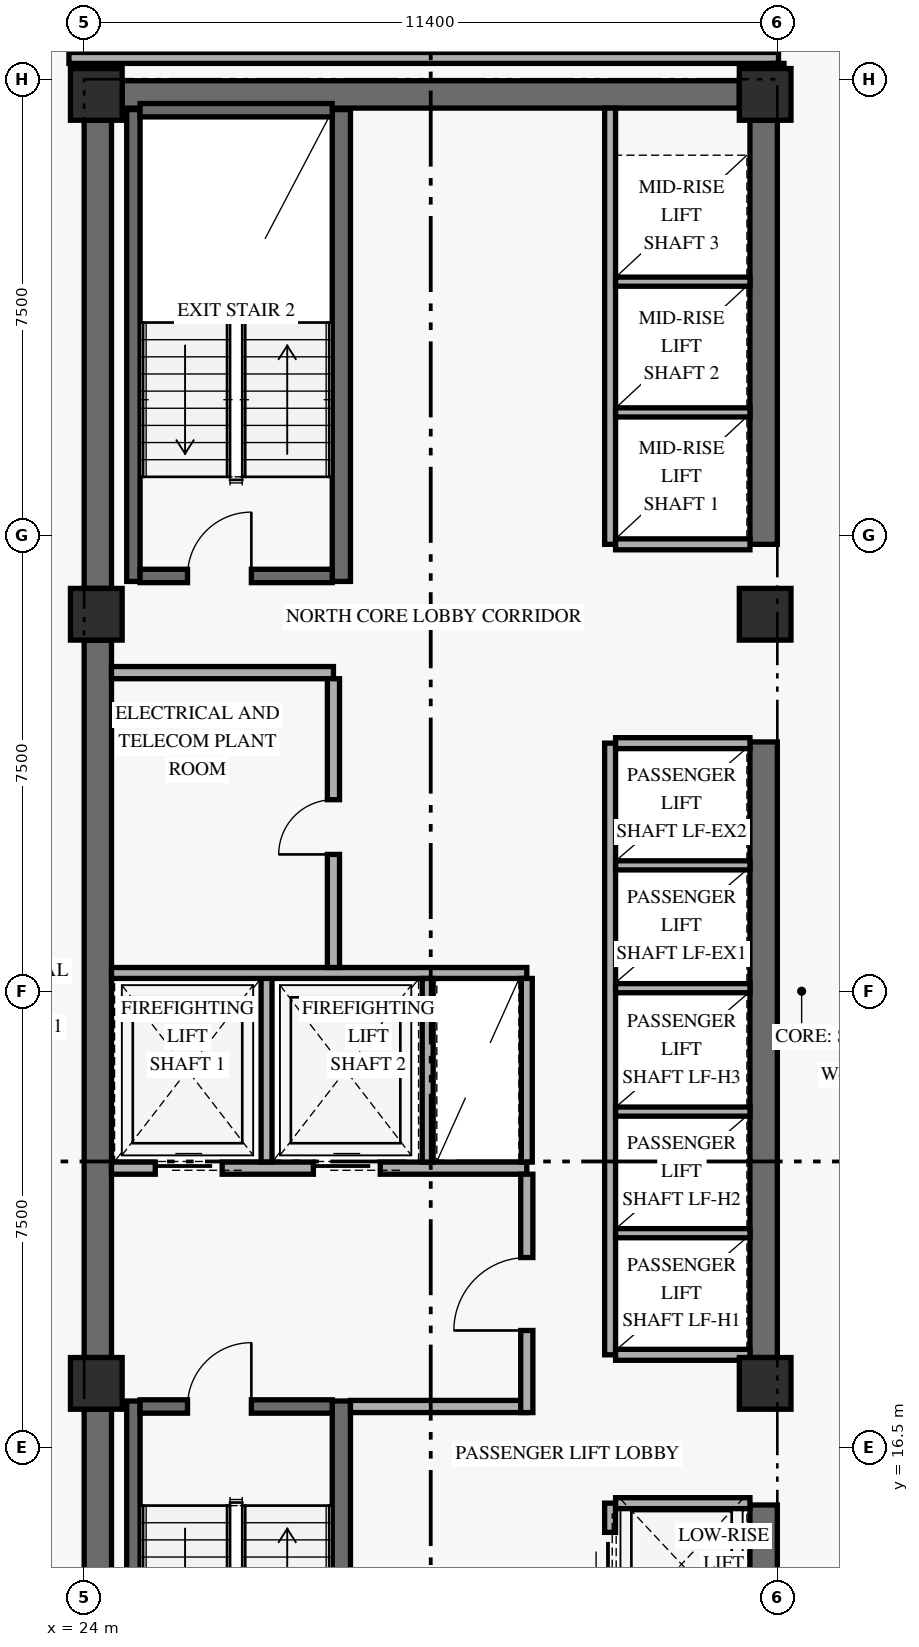
"""IFC4 building model, lengths in metres.
Left out: names, types, materials, properties, quantities, classifications, styles, units other than length and angle.
Written with IfcOpenShell. Run it as: python <this file> out.ifc"""

import sys

from ifc_helpers import new_model, si_unit, direction, frame, frame_2d, origin, origin_2d, place, context, subcontext, project, spatial, rectangle, extrude, element, fill, save


model = new_model("IFC4")
c1 = context("Model", 3, precision=1e-05, world=origin(), true_north=direction((0.0, 1.0)))
c2 = subcontext(c1, "Body", "Model", "MODEL_VIEW")
j1 = project(units=[si_unit("LENGTHUNIT", "METRE"), si_unit("PLANEANGLEUNIT", "RADIAN")], contexts=[c1])
p1 = place(None, origin())
s1 = spatial("IfcSite", under=j1, at=p1, CompositionType="ELEMENT")
p2 = place(p1, origin())
s2 = spatial("IfcBuilding", under=s1, at=p2, CompositionType="ELEMENT")
p3 = place(p2, frame((0.0, 0.0, 67.8)))
s3 = spatial("IfcBuildingStorey", under=s2, at=p3, CompositionType="ELEMENT", Elevation=67.8)
p4 = place(p3, frame((24.225, 9.675, 0.0), z_axis=(0.0, 0.0, 1.0), x_axis=(0.0, 1.0, 0.0)))
e1 = element("IfcWall", 1, at=p4, inside=s3, PredefinedType="SHEAR", context=c2, shape_type="SweptSolid", body=[
    extrude(rectangle(XDim=7.45, YDim=0.45, at=frame_2d((3.725, 0.0))), origin(), (0.0, 0.0, 1.0), 2.607),
])
p5 = place(p3, frame((24.225, 17.975, 0.0), z_axis=(0.0, 0.0, 1.0), x_axis=(0.0, 1.0, 0.0)))
e2 = element("IfcWall", 2, at=p5, inside=s3, PredefinedType="SHEAR", context=c2, shape_type="SweptSolid", body=[
    extrude(rectangle(XDim=11.8, YDim=0.45, at=frame_2d((5.9, 0.0))), origin(), (0.0, 0.0, 1.0), 2.607),
])
p6 = place(p3, frame((24.225, 30.625, 0.0), z_axis=(0.0, 0.0, 1.0), x_axis=(0.0, 1.0, 0.0)))
e3 = element("IfcWall", 3, at=p6, inside=s3, PredefinedType="SHEAR", context=c2, shape_type="SweptSolid", body=[
    extrude(rectangle(XDim=7.7, YDim=0.45, at=frame_2d((3.85, 0.0))), origin(), (0.0, 0.0, 1.0), 2.607),
])
p7 = place(p3, frame((35.175, 9.675, 0.0), z_axis=(0.0, 0.0, 1.0), x_axis=(0.0, 1.0, 0.0)))
e4 = element("IfcWall", 4, at=p7, inside=s3, PredefinedType="SHEAR", context=c2, shape_type="SweptSolid", body=[
    extrude(rectangle(XDim=5.875, YDim=0.45, at=frame_2d((2.938, 0.0))), origin(), (0.0, 0.0, 1.0), 2.607),
])
p8 = place(p3, frame((35.175, 17.975, 0.0), z_axis=(0.0, 0.0, 1.0), x_axis=(0.0, 1.0, 0.0)))
e5 = element("IfcWall", 5, at=p8, inside=s3, PredefinedType="SHEAR", context=c2, shape_type="SweptSolid", body=[
    extrude(rectangle(XDim=10.125, YDim=0.45, at=frame_2d((5.062, 0.0))), origin(), (0.0, 0.0, 1.0), 2.607),
])
p9 = place(p3, frame((35.175, 31.35, 0.0), z_axis=(0.0, 0.0, 1.0), x_axis=(0.0, 1.0, 0.0)))
e6 = element("IfcWall", 6, at=p9, inside=s3, PredefinedType="SHEAR", context=c2, shape_type="SweptSolid", body=[
    extrude(rectangle(XDim=6.975, YDim=0.45, at=frame_2d((3.487, 0.0))), origin(), (0.0, 0.0, 1.0), 2.607),
])
p10 = place(p3, frame((24.625, 38.75, 0.0), z_axis=(0.0, 0.0, 1.0), x_axis=(1.0, 0.0, 0.0)))
e7 = element("IfcWall", 7, at=p10, inside=s3, PredefinedType="SHEAR", context=c2, shape_type="SweptSolid", body=[
    extrude(rectangle(XDim=10.15, YDim=0.45, at=frame_2d((5.075, 0.0))), origin(), (0.0, 0.0, 1.0), 3.3),
])
p11 = place(p3, frame((24.81, 9.5, 0.0), z_axis=(0.0, 0.0, 1.0), x_axis=(0.0, 1.0, 0.0)))
e8 = element("IfcWall", 8, at=p11, inside=s3, PredefinedType="SHEAR", context=c2, shape_type="SweptSolid", body=[
    extrude(rectangle(XDim=7.76, YDim=0.22, at=frame_2d((3.88, 0.0))), origin(), (0.0, 0.0, 1.0), 3.3),
])
p12 = place(p3, frame((28.23, 9.5, 0.0), z_axis=(0.0, 0.0, 1.0), x_axis=(0.0, 1.0, 0.0)))
e9 = element("IfcWall", 9, at=p12, inside=s3, PredefinedType="SHEAR", context=c2, shape_type="SweptSolid", body=[
    extrude(rectangle(XDim=7.76, YDim=0.3, at=frame_2d((3.88, 0.0))), origin(), (0.0, 0.0, 1.0), 3.3),
])
p13 = place(p3, frame((24.92, 17.17, 0.0), z_axis=(0.0, 0.0, 1.0), x_axis=(1.0, 0.0, 0.0)))
e10 = element("IfcWall", 10, at=p13, inside=s3, PredefinedType="SHEAR", context=c2, shape_type="SweptSolid", body=[
    extrude(rectangle(XDim=3.16, YDim=0.22, at=frame_2d((1.58, 0.0))), origin(), (0.0, 0.0, 1.0), 3.3),
])
p14 = place(p13, frame((0.78, 0.0, 0.0)))
e11 = element("IfcOpeningElement", 11, at=p14, cuts=e10, PredefinedType="OPENING", context=c2, shape_type="SweptSolid", body=[
    extrude(rectangle(XDim=1.05, YDim=2.15, at=frame_2d((0.525, 1.075))), frame((0.0, 0.12, 0.0), z_axis=(0.0, -1.0, 0.0), x_axis=(1.0, 0.0, 0.0)), (0.0, 0.0, 1.0), 0.24),
])
p15 = place(p3, frame((24.81, 30.74, 0.0), z_axis=(0.0, 0.0, 1.0), x_axis=(0.0, 1.0, 0.0)))
e12 = element("IfcWall", 12, at=p15, inside=s3, PredefinedType="SHEAR", context=c2, shape_type="SweptSolid", body=[
    extrude(rectangle(XDim=7.76, YDim=0.22, at=frame_2d((3.88, 0.0))), origin(), (0.0, 0.0, 1.0), 3.3),
])
p16 = place(p3, frame((28.23, 30.74, 0.0), z_axis=(0.0, 0.0, 1.0), x_axis=(0.0, 1.0, 0.0)))
e13 = element("IfcWall", 13, at=p16, inside=s3, PredefinedType="SHEAR", context=c2, shape_type="SweptSolid", body=[
    extrude(rectangle(XDim=7.76, YDim=0.3, at=frame_2d((3.88, 0.0))), origin(), (0.0, 0.0, 1.0), 3.3),
])
p17 = place(p3, frame((24.92, 30.83, 0.0), z_axis=(0.0, 0.0, 1.0), x_axis=(1.0, 0.0, 0.0)))
e14 = element("IfcWall", 14, at=p17, inside=s3, PredefinedType="SHEAR", context=c2, shape_type="SweptSolid", body=[
    extrude(rectangle(XDim=3.16, YDim=0.22, at=frame_2d((1.58, 0.0))), origin(), (0.0, 0.0, 1.0), 3.3),
])
p18 = place(p17, frame((0.78, 0.0, 0.0)))
e15 = element("IfcOpeningElement", 15, at=p18, cuts=e14, PredefinedType="OPENING", context=c2, shape_type="SweptSolid", body=[
    extrude(rectangle(XDim=1.05, YDim=2.15, at=frame_2d((0.525, 1.075))), frame((0.0, 0.12, 0.0), z_axis=(0.0, -1.0, 0.0), x_axis=(1.0, 0.0, 0.0)), (0.0, 0.0, 1.0), 0.24),
])
p19 = place(p3, frame((24.92, 38.49, 0.0), z_axis=(0.0, 0.0, 1.0), x_axis=(1.0, 0.0, 0.0)))
e16 = element("IfcWall", 16, at=p19, inside=s3, PredefinedType="SHEAR", context=c2, shape_type="SweptSolid", body=[
    extrude(rectangle(XDim=3.16, YDim=0.22, at=frame_2d((1.58, 0.0))), origin(), (0.0, 0.0, 1.0), 3.3),
])
for number, where, z_axis, x_axis in (
    (17, (24.2, 17.55, 0.0), (0.0, 0.0, 1.0), (1.0, 0.0, 0.0)),
    (18, (24.2, 30.2, 0.0), (0.0, 0.0, 1.0), (1.0, 0.0, 0.0)),
    (19, (24.2, 38.75, 0.0), (0.0, 0.0, 1.0), (1.0, 0.0, 0.0)),
    (20, (35.2, 17.55, 0.0), (0.0, 0.0, 1.0), (1.0, 0.0, 0.0)),
    (21, (35.2, 30.2, 0.0), (0.0, 0.0, 1.0), (1.0, 0.0, 0.0)),
    (22, (35.2, 38.75, 0.0), (0.0, 0.0, 1.0), (1.0, 0.0, 0.0)),
):
    element("IfcColumn", number, at=place(p3, frame(where, z_axis=z_axis, x_axis=x_axis)), inside=s3, PredefinedType="COLUMN", context=c2, shape_type="SweptSolid", body=[
        extrude(rectangle(XDim=0.85, YDim=0.85, at=origin_2d()), origin(), (0.0, 0.0, 1.0), 3.6),
    ])
p20 = place(p3, frame((24.45, 21.09, 0.0), z_axis=(0.0, 0.0, 1.0), x_axis=(1.0, 0.0, 0.0)))
e23 = element("IfcWall", 23, at=p20, inside=s3, PredefinedType="STANDARD", context=c2, shape_type="SweptSolid", body=[
    extrude(rectangle(XDim=6.83, YDim=0.2, at=frame_2d((3.415, 0.0))), origin(), (0.0, 0.0, 1.0), 3.3),
])
p21 = place(p20, frame((0.72, 0.0, 0.0)))
e24 = element("IfcOpeningElement", 24, at=p21, cuts=e23, PredefinedType="OPENING", context=c2, shape_type="SweptSolid", body=[
    extrude(rectangle(XDim=1.1, YDim=2.2, at=frame_2d((0.55, 1.1))), frame((0.0, 0.11, 0.0), z_axis=(0.0, -1.0, 0.0), x_axis=(1.0, 0.0, 0.0)), (0.0, 0.0, 1.0), 0.22),
])
p22 = place(p20, frame((3.32, 0.0, 0.0)))
e25 = element("IfcOpeningElement", 25, at=p22, cuts=e23, PredefinedType="OPENING", context=c2, shape_type="SweptSolid", body=[
    extrude(rectangle(XDim=1.1, YDim=2.2, at=frame_2d((0.55, 1.1))), frame((0.0, 0.11, 0.0), z_axis=(0.0, -1.0, 0.0), x_axis=(1.0, 0.0, 0.0)), (0.0, 0.0, 1.0), 0.22),
])
p23 = place(p3, frame((28.38, 17.17, 0.0), z_axis=(0.0, 0.0, 1.0), x_axis=(1.0, 0.0, 0.0)))
e26 = element("IfcWall", 26, at=p23, inside=s3, PredefinedType="STANDARD", context=c2, shape_type="SweptSolid", body=[
    extrude(rectangle(XDim=2.9, YDim=0.2, at=frame_2d((1.45, 0.0))), origin(), (0.0, 0.0, 1.0), 3.3),
])
p24 = place(p3, frame((31.28, 17.07, 0.0), z_axis=(0.0, 0.0, 1.0), x_axis=(0.0, 1.0, 0.0)))
e27 = element("IfcWall", 27, at=p24, inside=s3, PredefinedType="STANDARD", context=c2, shape_type="SweptSolid", body=[
    extrude(rectangle(XDim=3.92, YDim=0.2, at=frame_2d((1.96, 0.0))), origin(), (0.0, 0.0, 1.0), 2.589),
])
p25 = place(p24, frame((1.35, 0.0, 0.0)))
e28 = element("IfcOpeningElement", 28, at=p25, cuts=e27, PredefinedType="OPENING", context=c2, shape_type="SweptSolid", body=[
    extrude(rectangle(XDim=1.2, YDim=2.15, at=frame_2d((0.6, 1.075))), frame((0.0, 0.11, 0.0), z_axis=(0.0, -1.0, 0.0), x_axis=(1.0, 0.0, 0.0)), (0.0, 0.0, 1.0), 0.22),
])
p26 = place(p3, frame((27.0, 21.19, 0.0), z_axis=(0.0, 0.0, 1.0), x_axis=(0.0, 1.0, 0.0)))
e29 = element("IfcWall", 29, at=p26, inside=s3, PredefinedType="STANDARD", context=c2, shape_type="SweptSolid", body=[
    extrude(rectangle(XDim=3.11, YDim=0.18, at=frame_2d((1.555, 0.0))), origin(), (0.0, 0.0, 1.0), 3.3),
])
p27 = place(p3, frame((24.45, 24.3, 0.0), z_axis=(0.0, 0.0, 1.0), x_axis=(1.0, 0.0, 0.0)))
e30 = element("IfcWall", 30, at=p27, inside=s3, PredefinedType="STANDARD", context=c2, shape_type="SweptSolid", body=[
    extrude(rectangle(XDim=6.83, YDim=0.18, at=frame_2d((3.415, 0.0))), origin(), (0.0, 0.0, 1.0), 3.3),
])
for number, where, z_axis, x_axis in (
    (31, (29.65, 21.19, 0.0), (0.0, 0.0, 1.0), (0.0, 1.0, 0.0)),
    (32, (31.28, 21.19, 0.0), (0.0, 0.0, 1.0), (0.0, 1.0, 0.0)),
):
    element("IfcWall", number, at=place(p3, frame(where, z_axis=z_axis, x_axis=x_axis)), inside=s3, PredefinedType="STANDARD", context=c2, shape_type="SweptSolid", body=[
        extrude(rectangle(XDim=3.02, YDim=0.18, at=frame_2d((1.51, 0.0))), origin(), (0.0, 0.0, 1.0), 3.3),
    ])
p28 = place(p3, frame((24.45, 29.24, 0.0), z_axis=(0.0, 0.0, 1.0), x_axis=(1.0, 0.0, 0.0)))
e33 = element("IfcWall", 33, at=p28, inside=s3, PredefinedType="STANDARD", context=c2, shape_type="SweptSolid", body=[
    extrude(rectangle(XDim=3.65, YDim=0.2, at=frame_2d((1.825, 0.0))), origin(), (0.0, 0.0, 1.0), 3.3),
])
p29 = place(p3, frame((28.1, 24.39, 0.0), z_axis=(0.0, 0.0, 1.0), x_axis=(0.0, 1.0, 0.0)))
e34 = element("IfcWall", 34, at=p29, inside=s3, PredefinedType="STANDARD", context=c2, shape_type="SweptSolid", body=[
    extrude(rectangle(XDim=4.75, YDim=0.2, at=frame_2d((2.375, 0.0))), origin(), (0.0, 0.0, 1.0), 3.3),
])
p30 = place(p29, frame((1.86, 0.0, 0.0)))
e35 = element("IfcOpeningElement", 35, at=p30, cuts=e34, PredefinedType="OPENING", context=c2, shape_type="SweptSolid", body=[
    extrude(rectangle(XDim=0.9, YDim=2.1, at=frame_2d((0.45, 1.05))), frame((0.0, 0.11, 0.0), z_axis=(0.0, -1.0, 0.0), x_axis=(1.0, 0.0, 0.0)), (0.0, 0.0, 1.0), 0.22),
])
p31 = place(p3, frame((32.65, 9.5, 0.0), z_axis=(0.0, 0.0, 1.0), x_axis=(0.0, 1.0, 0.0)))
e36 = element("IfcWall", 36, at=p31, inside=s3, PredefinedType="STANDARD", context=c2, shape_type="SweptSolid", body=[
    extrude(rectangle(XDim=6.08, YDim=0.18, at=frame_2d((3.04, 0.0))), origin(), (0.0, 0.0, 1.0), 3.3),
])
p32 = place(p31, frame((0.55, 0.0, 0.0)))
e37 = element("IfcOpeningElement", 37, at=p32, cuts=e36, PredefinedType="OPENING", context=c2, shape_type="SweptSolid", body=[
    extrude(rectangle(XDim=1.05, YDim=2.2, at=frame_2d((0.525, 1.1))), frame((0.0, 0.1, 0.0), z_axis=(0.0, -1.0, 0.0), x_axis=(1.0, 0.0, 0.0)), (0.0, 0.0, 1.0), 0.2),
])
p33 = place(p31, frame((2.55, 0.0, 0.0)))
e38 = element("IfcOpeningElement", 38, at=p33, cuts=e36, PredefinedType="OPENING", context=c2, shape_type="SweptSolid", body=[
    extrude(rectangle(XDim=1.05, YDim=2.2, at=frame_2d((0.525, 1.1))), frame((0.0, 0.1, 0.0), z_axis=(0.0, -1.0, 0.0), x_axis=(1.0, 0.0, 0.0)), (0.0, 0.0, 1.0), 0.2),
])
p34 = place(p31, frame((4.55, 0.0, 0.0)))
e39 = element("IfcOpeningElement", 39, at=p34, cuts=e36, PredefinedType="OPENING", context=c2, shape_type="SweptSolid", body=[
    extrude(rectangle(XDim=1.05, YDim=2.2, at=frame_2d((0.525, 1.1))), frame((0.0, 0.1, 0.0), z_axis=(0.0, -1.0, 0.0), x_axis=(1.0, 0.0, 0.0)), (0.0, 0.0, 1.0), 0.2),
])
p35 = place(p3, frame((32.74, 15.58, 0.0), z_axis=(0.0, 0.0, 1.0), x_axis=(1.0, 0.0, 0.0)))
e40 = element("IfcWall", 40, at=p35, inside=s3, PredefinedType="STANDARD", context=c2, shape_type="SweptSolid", body=[
    extrude(rectangle(XDim=2.21, YDim=0.18, at=frame_2d((1.105, 0.0))), origin(), (0.0, 0.0, 1.0), 3.3),
])
p36 = place(p3, frame((32.65, 18.02, 0.0), z_axis=(0.0, 0.0, 1.0), x_axis=(0.0, 1.0, 0.0)))
e41 = element("IfcWall", 41, at=p36, inside=s3, PredefinedType="STANDARD", context=c2, shape_type="SweptSolid", body=[
    extrude(rectangle(XDim=10.06, YDim=0.18, at=frame_2d((5.03, 0.0))), origin(), (0.0, 0.0, 1.0), 3.3),
])
for number, where, z_axis, x_axis in (
    (42, (32.74, 18.02, 0.0), (0.0, 0.0, 1.0), (1.0, 0.0, 0.0)),
    (43, (32.74, 28.08, 0.0), (0.0, 0.0, 1.0), (1.0, 0.0, 0.0)),
):
    element("IfcWall", number, at=place(p3, frame(where, z_axis=z_axis, x_axis=x_axis)), inside=s3, PredefinedType="STANDARD", context=c2, shape_type="SweptSolid", body=[
        extrude(rectangle(XDim=2.21, YDim=0.18, at=frame_2d((1.105, 0.0))), origin(), (0.0, 0.0, 1.0), 3.3),
    ])
for number, where, z_axis, x_axis in (
    (44, (32.74, 20.02, 0.0), (0.0, 0.0, 1.0), (1.0, 0.0, 0.0)),
    (45, (32.74, 22.02, 0.0), (0.0, 0.0, 1.0), (1.0, 0.0, 0.0)),
    (46, (32.74, 24.05, 0.0), (0.0, 0.0, 1.0), (1.0, 0.0, 0.0)),
    (47, (32.74, 26.07, 0.0), (0.0, 0.0, 1.0), (1.0, 0.0, 0.0)),
):
    element("IfcWall", number, at=place(p3, frame(where, z_axis=z_axis, x_axis=x_axis)), inside=s3, PredefinedType="STANDARD", context=c2, shape_type="SweptSolid", body=[
        extrude(rectangle(XDim=2.21, YDim=0.15, at=frame_2d((1.105, 0.0))), origin(), (0.0, 0.0, 1.0), 3.3),
    ])
p37 = place(p3, frame((32.65, 31.35, 0.0), z_axis=(0.0, 0.0, 1.0), x_axis=(0.0, 1.0, 0.0)))
e48 = element("IfcWall", 48, at=p37, inside=s3, PredefinedType="STANDARD", context=c2, shape_type="SweptSolid", body=[
    extrude(rectangle(XDim=7.175, YDim=0.18, at=frame_2d((3.587, 0.0))), origin(), (0.0, 0.0, 1.0), 3.3),
])
p38 = place(p3, frame((32.74, 31.35, 0.0), z_axis=(0.0, 0.0, 1.0), x_axis=(1.0, 0.0, 0.0)))
e49 = element("IfcWall", 49, at=p38, inside=s3, PredefinedType="STANDARD", context=c2, shape_type="SweptSolid", body=[
    extrude(rectangle(XDim=2.21, YDim=0.18, at=frame_2d((1.105, 0.0))), origin(), (0.0, 0.0, 1.0), 3.3),
])
for number, where, z_axis, x_axis in (
    (50, (32.74, 33.52, 0.0), (0.0, 0.0, 1.0), (1.0, 0.0, 0.0)),
    (51, (32.74, 35.67, 0.0), (0.0, 0.0, 1.0), (1.0, 0.0, 0.0)),
):
    element("IfcWall", number, at=place(p3, frame(where, z_axis=z_axis, x_axis=x_axis)), inside=s3, PredefinedType="STANDARD", context=c2, shape_type="SweptSolid", body=[
        extrude(rectangle(XDim=2.21, YDim=0.15, at=frame_2d((1.105, 0.0))), origin(), (0.0, 0.0, 1.0), 3.3),
    ])
p39 = place(p3, frame((23.75, 39.35, 0.0), z_axis=(0.0, 0.0, 1.0), x_axis=(1.0, 0.0, 0.0)))
e52 = element("IfcWall", 52, at=p39, inside=s3, PredefinedType="STANDARD", context=c2, shape_type="SweptSolid", body=[
    extrude(rectangle(XDim=11.67, YDim=0.18, at=frame_2d((5.835, 0.0))), origin(), (0.0, 0.0, 1.0), 2.589),
])
p40 = place(p3, frame((35.42, 38.75, 0.0), z_axis=(0.0, 0.0, 1.0), x_axis=(0.0, 1.0, 0.0)))
e53 = element("IfcWall", 53, at=p40, inside=s3, PredefinedType="STANDARD", context=c2, shape_type="SweptSolid", body=[
    extrude(rectangle(XDim=0.51, YDim=0.18, at=frame_2d((0.255, 0.0))), origin(), (0.0, 0.0, 1.0), 3.3),
])
p41 = place(p14, frame((1.05, 0.0, 0.0), z_axis=(0.0, 0.0, 1.0), x_axis=(-1.0, 0.0, 0.0)))
e54 = element("IfcDoor", 54, at=p41, inside=s3, OperationType="SINGLE_SWING_LEFT", PredefinedType="DOOR", context=c2, shape_type="SweptSolid", body=[
    extrude(rectangle(XDim=1.05, YDim=2.15, at=frame_2d((0.525, 1.075))), frame((0.0, 0.025, 0.0), z_axis=(0.0, -1.0, 0.0), x_axis=(1.0, 0.0, 0.0)), (0.0, 0.0, 1.0), 0.05),
])
fill(e11, e54)
p42 = place(p18, origin())
e55 = element("IfcDoor", 55, at=p42, inside=s3, OperationType="SINGLE_SWING_RIGHT", PredefinedType="DOOR", context=c2, shape_type="SweptSolid", body=[
    extrude(rectangle(XDim=1.05, YDim=2.15, at=frame_2d((0.525, 1.075))), frame((0.0, 0.025, 0.0), z_axis=(0.0, -1.0, 0.0), x_axis=(1.0, 0.0, 0.0)), (0.0, 0.0, 1.0), 0.05),
])
fill(e15, e55)
p43 = place(p21, origin())
e56 = element("IfcDoor", 56, at=p43, inside=s3, OperationType="SLIDING_TO_LEFT", PredefinedType="DOOR", context=c2, shape_type="SweptSolid", body=[
    extrude(rectangle(XDim=1.1, YDim=2.2, at=frame_2d((0.55, 1.1))), frame((0.0, 0.025, 0.0), z_axis=(0.0, -1.0, 0.0), x_axis=(1.0, 0.0, 0.0)), (0.0, 0.0, 1.0), 0.05),
])
fill(e24, e56)
p44 = place(p22, origin())
e57 = element("IfcDoor", 57, at=p44, inside=s3, OperationType="SLIDING_TO_LEFT", PredefinedType="DOOR", context=c2, shape_type="SweptSolid", body=[
    extrude(rectangle(XDim=1.1, YDim=2.2, at=frame_2d((0.55, 1.1))), frame((0.0, 0.025, 0.0), z_axis=(0.0, -1.0, 0.0), x_axis=(1.0, 0.0, 0.0)), (0.0, 0.0, 1.0), 0.05),
])
fill(e25, e57)
p45 = place(p25, origin())
e58 = element("IfcDoor", 58, at=p45, inside=s3, OperationType="SINGLE_SWING_LEFT", PredefinedType="DOOR", context=c2, shape_type="SweptSolid", body=[
    extrude(rectangle(XDim=1.2, YDim=2.15, at=frame_2d((0.6, 1.075))), frame((0.0, 0.025, 0.0), z_axis=(0.0, -1.0, 0.0), x_axis=(1.0, 0.0, 0.0)), (0.0, 0.0, 1.0), 0.05),
])
fill(e28, e58)
p46 = place(p30, origin())
e59 = element("IfcDoor", 59, at=p46, inside=s3, OperationType="SINGLE_SWING_LEFT", PredefinedType="DOOR", context=c2, shape_type="SweptSolid", body=[
    extrude(rectangle(XDim=0.9, YDim=2.1, at=frame_2d((0.45, 1.05))), frame((0.0, 0.025, 0.0), z_axis=(0.0, -1.0, 0.0), x_axis=(1.0, 0.0, 0.0)), (0.0, 0.0, 1.0), 0.05),
])
fill(e35, e59)
p47 = place(p34, origin())
e60 = element("IfcDoor", 60, at=p47, inside=s3, OperationType="SLIDING_TO_LEFT", PredefinedType="DOOR", context=c2, shape_type="SweptSolid", body=[
    extrude(rectangle(XDim=1.05, YDim=2.2, at=frame_2d((0.525, 1.1))), frame((0.0, 0.025, 0.0), z_axis=(0.0, -1.0, 0.0), x_axis=(1.0, 0.0, 0.0)), (0.0, 0.0, 1.0), 0.05),
])
fill(e39, e60)
save(model, sys.argv[1])
